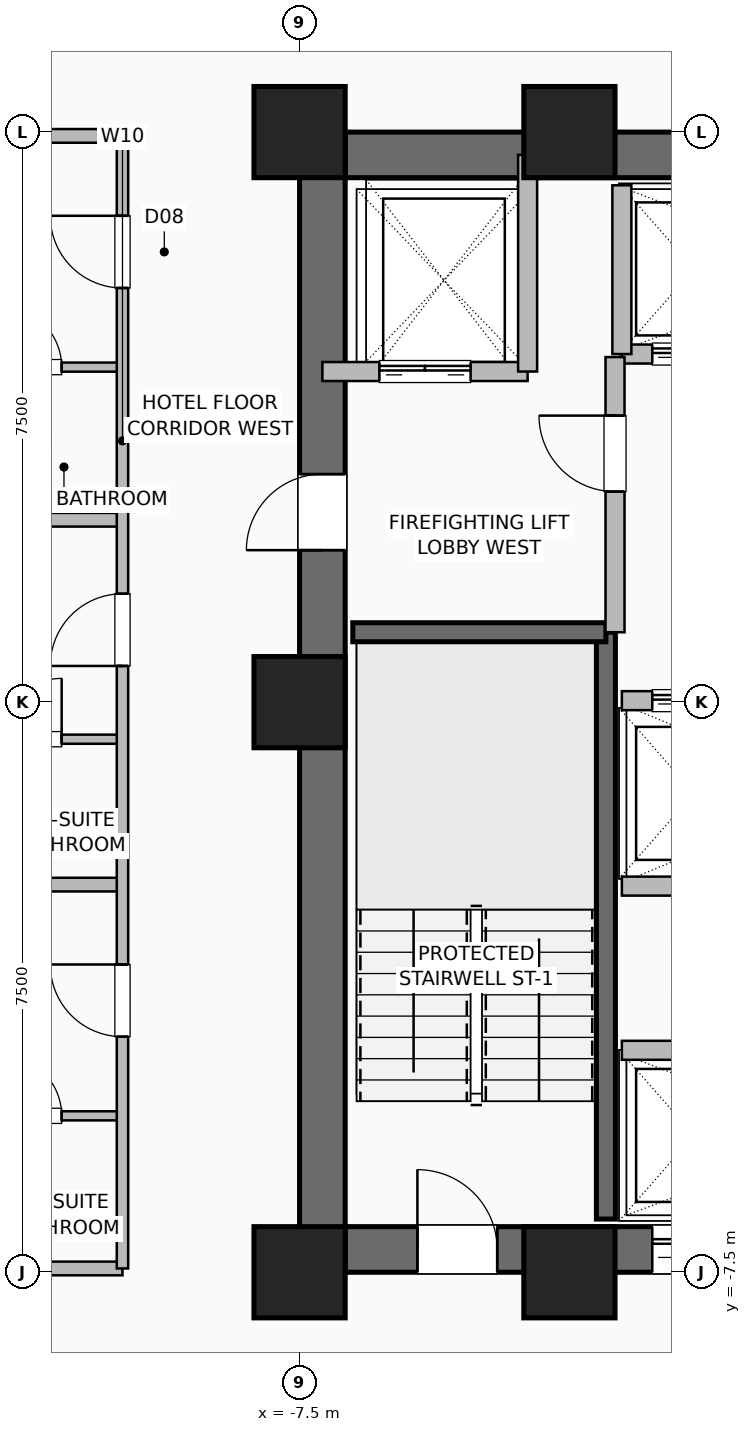
"""IFC4 building model, lengths in metres.
Left out: names, types, materials, properties, quantities, classifications, styles, units other than length and angle.
Written with IfcOpenShell. Run it as: python <this file> out.ifc"""

import sys

from ifc_helpers import new_model, si_unit, direction, frame, frame_2d, origin, origin_2d, place, context, subcontext, project, spatial, rectangle, hollow_rectangle, extrude, element, fill, save


model = new_model("IFC4")
c1 = context("Model", 3, precision=1e-05, world=origin(), true_north=direction((0.0, 1.0)))
c2 = subcontext(c1, "Body", "Model", "MODEL_VIEW")
j1 = project(units=[si_unit("LENGTHUNIT", "METRE"), si_unit("PLANEANGLEUNIT", "RADIAN")], contexts=[c1])
p1 = place(None, origin())
s1 = spatial("IfcSite", under=j1, at=p1, CompositionType="ELEMENT")
p2 = place(p1, origin())
s2 = spatial("IfcBuilding", under=s1, at=p2, CompositionType="ELEMENT")
p3 = place(p2, frame((0.0, 0.0, 34.0)))
s3 = spatial("IfcBuildingStorey", under=s2, at=p3, CompositionType="ELEMENT", Elevation=34.0)
for number, where, z_axis, x_axis in (
    (1, (-7.5, -7.5, 0.0), (0.0, 0.0, 1.0), (1.0, 0.0, 0.0)),
    (2, (-3.95, -7.5, 0.0), (0.0, 0.0, 1.0), (1.0, 0.0, 0.0)),
    (3, (-3.95, 7.5, 0.0), (0.0, 0.0, 1.0), (1.0, 0.0, 0.0)),
    (4, (-7.5, 7.5, 0.0), (0.0, 0.0, 1.0), (1.0, 0.0, 0.0)),
    (5, (-7.5, 0.0, 0.0), (0.0, 0.0, 1.0), (1.0, 0.0, 0.0)),
):
    element("IfcColumn", number, at=place(p3, frame(where, z_axis=z_axis, x_axis=x_axis)), inside=s3, PredefinedType="COLUMN", context=c2, shape_type="SweptSolid", body=[
        extrude(hollow_rectangle(XDim=1.2, YDim=1.2, WallThickness=0.055, at=origin_2d()), origin(), (0.0, 0.0, 1.0), 3.5),
    ])
p4 = place(p3, frame((-7.5, -7.2, 0.0), z_axis=(0.0, 0.0, 1.0), x_axis=(1.0, 0.0, 0.0)))
e6 = element("IfcWall", 6, at=p4, inside=s3, PredefinedType="SHEAR", context=c2, shape_type="SweptSolid", body=[
    extrude(rectangle(XDim=15.0, YDim=0.6, at=frame_2d((7.5, 0.0))), origin(), (0.0, 0.0, 1.0), 3.25),
])
p5 = place(p4, frame((1.55, 0.0, 0.0)))
e7 = element("IfcOpeningElement", 7, at=p5, cuts=e6, PredefinedType="OPENING", context=c2, shape_type="SweptSolid", body=[
    extrude(rectangle(XDim=1.05, YDim=2.08, at=frame_2d((0.525, 1.04))), frame((0.0, 0.31, 0.0), z_axis=(0.0, -1.0, 0.0), x_axis=(1.0, 0.0, 0.0)), (0.0, 0.0, 1.0), 0.62),
])
p6 = place(p4, frame((12.4, 0.0, 0.0)))
e8 = element("IfcOpeningElement", 8, at=p6, cuts=e6, PredefinedType="OPENING", context=c2, shape_type="SweptSolid", body=[
    extrude(rectangle(XDim=1.05, YDim=2.08, at=frame_2d((0.525, 1.04))), frame((0.0, 0.31, 0.0), z_axis=(0.0, -1.0, 0.0), x_axis=(1.0, 0.0, 0.0)), (0.0, 0.0, 1.0), 0.62),
])
p7 = place(p4, frame((4.64, 0.0, 0.0)))
e9 = element("IfcOpeningElement", 9, at=p7, cuts=e6, PredefinedType="OPENING", context=c2, shape_type="SweptSolid", body=[
    extrude(rectangle(XDim=1.1, YDim=2.2, at=frame_2d((0.55, 1.1))), frame((0.0, 0.31, 0.0), z_axis=(0.0, -1.0, 0.0), x_axis=(1.0, 0.0, 0.0)), (0.0, 0.0, 1.0), 0.62),
])
p8 = place(p4, frame((6.52, 0.0, 0.0)))
e10 = element("IfcOpeningElement", 10, at=p8, cuts=e6, PredefinedType="OPENING", context=c2, shape_type="SweptSolid", body=[
    extrude(rectangle(XDim=1.1, YDim=2.2, at=frame_2d((0.55, 1.1))), frame((0.0, 0.31, 0.0), z_axis=(0.0, -1.0, 0.0), x_axis=(1.0, 0.0, 0.0)), (0.0, 0.0, 1.0), 0.62),
])
p9 = place(p4, frame((8.4, 0.0, 0.0)))
e11 = element("IfcOpeningElement", 11, at=p9, cuts=e6, PredefinedType="OPENING", context=c2, shape_type="SweptSolid", body=[
    extrude(rectangle(XDim=1.1, YDim=2.2, at=frame_2d((0.55, 1.1))), frame((0.0, 0.31, 0.0), z_axis=(0.0, -1.0, 0.0), x_axis=(1.0, 0.0, 0.0)), (0.0, 0.0, 1.0), 0.62),
])
p10 = place(p3, frame((-7.5, 7.2, 0.0), z_axis=(0.0, 0.0, 1.0), x_axis=(1.0, 0.0, 0.0)))
e12 = element("IfcWall", 12, at=p10, inside=s3, PredefinedType="SHEAR", context=c2, shape_type="SweptSolid", body=[
    extrude(rectangle(XDim=15.0, YDim=0.6, at=frame_2d((7.5, 0.0))), origin(), (0.0, 0.0, 1.0), 3.25),
])
p11 = place(p3, frame((-7.2, -7.5, 0.0), z_axis=(0.0, 0.0, 1.0), x_axis=(0.0, 1.0, 0.0)))
e13 = element("IfcWall", 13, at=p11, inside=s3, PredefinedType="SHEAR", context=c2, shape_type="SweptSolid", body=[
    extrude(rectangle(XDim=15.0, YDim=0.6, at=frame_2d((7.5, 0.0))), origin(), (0.0, 0.0, 1.0), 3.25),
])
p12 = place(p11, frame((9.5, 0.0, 0.0)))
e14 = element("IfcOpeningElement", 14, at=p12, cuts=e13, PredefinedType="OPENING", context=c2, shape_type="SweptSolid", body=[
    extrude(rectangle(XDim=1.0, YDim=2.08, at=frame_2d((0.5, 1.04))), frame((0.0, 0.31, 0.0), z_axis=(0.0, -1.0, 0.0), x_axis=(1.0, 0.0, 0.0)), (0.0, 0.0, 1.0), 0.62),
])
p13 = place(p3, frame((-3.47, -6.8, 0.0), z_axis=(0.0, 0.0, 1.0), x_axis=(0.0, 1.0, 0.0)))
e15 = element("IfcWall", 15, at=p13, inside=s3, PredefinedType="SHEAR", context=c2, shape_type="SweptSolid", body=[
    extrude(rectangle(XDim=7.72, YDim=0.25, at=frame_2d((3.86, 0.0))), origin(), (0.0, 0.0, 1.0), 3.25),
])
p14 = place(p3, frame((-6.8, 0.92, 0.0), z_axis=(0.0, 0.0, 1.0), x_axis=(1.0, 0.0, 0.0)))
e16 = element("IfcWall", 16, at=p14, inside=s3, PredefinedType="SHEAR", context=c2, shape_type="SweptSolid", body=[
    extrude(rectangle(XDim=3.33, YDim=0.25, at=frame_2d((1.665, 0.0))), origin(), (0.0, 0.0, 1.0), 3.25),
])
p15 = place(p3, frame((-3.26, -4.58, 0.0), z_axis=(0.0, 0.0, 1.0), x_axis=(1.0, 0.0, 0.0)))
e17 = element("IfcWall", 17, at=p15, inside=s3, PredefinedType="SHEAR", context=c2, shape_type="SweptSolid", body=[
    extrude(rectangle(XDim=5.64, YDim=0.25, at=frame_2d((2.82, 0.0))), origin(), (0.0, 0.0, 1.0), 3.25),
])
p16 = place(p3, frame((-3.26, 0.02, 0.0), z_axis=(0.0, 0.0, 1.0), x_axis=(1.0, 0.0, 0.0)))
e18 = element("IfcWall", 18, at=p16, inside=s3, PredefinedType="SHEAR", context=c2, shape_type="SweptSolid", body=[
    extrude(rectangle(XDim=5.64, YDim=0.25, at=frame_2d((2.82, 0.0))), origin(), (0.0, 0.0, 1.0), 3.25),
])
p17 = place(p16, frame((0.4, 0.0, 0.0)))
e19 = element("IfcOpeningElement", 19, at=p17, cuts=e18, PredefinedType="OPENING", context=c2, shape_type="SweptSolid", body=[
    extrude(rectangle(XDim=1.1, YDim=2.2, at=frame_2d((0.55, 1.1))), frame((0.0, 0.135, 0.0), z_axis=(0.0, -1.0, 0.0), x_axis=(1.0, 0.0, 0.0)), (0.0, 0.0, 1.0), 0.27),
])
p18 = place(p16, frame((2.28, 0.0, 0.0)))
e20 = element("IfcOpeningElement", 20, at=p18, cuts=e18, PredefinedType="OPENING", context=c2, shape_type="SweptSolid", body=[
    extrude(rectangle(XDim=1.1, YDim=2.2, at=frame_2d((0.55, 1.1))), frame((0.0, 0.135, 0.0), z_axis=(0.0, -1.0, 0.0), x_axis=(1.0, 0.0, 0.0)), (0.0, 0.0, 1.0), 0.27),
])
p19 = place(p16, frame((4.16, 0.0, 0.0)))
e21 = element("IfcOpeningElement", 21, at=p19, cuts=e18, PredefinedType="OPENING", context=c2, shape_type="SweptSolid", body=[
    extrude(rectangle(XDim=1.1, YDim=2.2, at=frame_2d((0.55, 1.1))), frame((0.0, 0.135, 0.0), z_axis=(0.0, -1.0, 0.0), x_axis=(1.0, 0.0, 0.0)), (0.0, 0.0, 1.0), 0.27),
])
p20 = place(p3, frame((-3.26, -2.42, 0.0), z_axis=(0.0, 0.0, 1.0), x_axis=(1.0, 0.0, 0.0)))
e22 = element("IfcWall", 22, at=p20, inside=s3, PredefinedType="SHEAR", context=c2, shape_type="SweptSolid", body=[
    extrude(rectangle(XDim=5.64, YDim=0.25, at=frame_2d((2.82, 0.0))), origin(), (0.0, 0.0, 1.0), 3.25),
])
p21 = place(p3, frame((-3.26, 4.58, 0.0), z_axis=(0.0, 0.0, 1.0), x_axis=(1.0, 0.0, 0.0)))
e23 = element("IfcWall", 23, at=p21, inside=s3, PredefinedType="SHEAR", context=c2, shape_type="SweptSolid", body=[
    extrude(rectangle(XDim=5.64, YDim=0.25, at=frame_2d((2.82, 0.0))), origin(), (0.0, 0.0, 1.0), 3.25),
])
p22 = place(p21, frame((0.4, 0.0, 0.0)))
e24 = element("IfcOpeningElement", 24, at=p22, cuts=e23, PredefinedType="OPENING", context=c2, shape_type="SweptSolid", body=[
    extrude(rectangle(XDim=1.1, YDim=2.2, at=frame_2d((0.55, 1.1))), frame((0.0, 0.135, 0.0), z_axis=(0.0, -1.0, 0.0), x_axis=(1.0, 0.0, 0.0)), (0.0, 0.0, 1.0), 0.27),
])
p23 = place(p21, frame((2.28, 0.0, 0.0)))
e25 = element("IfcOpeningElement", 25, at=p23, cuts=e23, PredefinedType="OPENING", context=c2, shape_type="SweptSolid", body=[
    extrude(rectangle(XDim=1.1, YDim=2.2, at=frame_2d((0.55, 1.1))), frame((0.0, 0.135, 0.0), z_axis=(0.0, -1.0, 0.0), x_axis=(1.0, 0.0, 0.0)), (0.0, 0.0, 1.0), 0.27),
])
p24 = place(p21, frame((4.16, 0.0, 0.0)))
e26 = element("IfcOpeningElement", 26, at=p24, cuts=e23, PredefinedType="OPENING", context=c2, shape_type="SweptSolid", body=[
    extrude(rectangle(XDim=1.1, YDim=2.2, at=frame_2d((0.55, 1.1))), frame((0.0, 0.135, 0.0), z_axis=(0.0, -1.0, 0.0), x_axis=(1.0, 0.0, 0.0)), (0.0, 0.0, 1.0), 0.27),
])
p25 = place(p3, frame((-3.26, 4.58, 0.0), z_axis=(0.0, 0.0, 1.0), x_axis=(0.0, 1.0, 0.0)))
e27 = element("IfcWall", 27, at=p25, inside=s3, PredefinedType="SHEAR", context=c2, shape_type="SweptSolid", body=[
    extrude(rectangle(XDim=2.22, YDim=0.25, at=frame_2d((1.11, 0.0))), origin(), (0.0, 0.0, 1.0), 3.25),
])
p26 = place(p3, frame((-7.2, 4.35, 0.0), z_axis=(0.0, 0.0, 1.0), x_axis=(1.0, 0.0, 0.0)))
e28 = element("IfcWall", 28, at=p26, inside=s3, PredefinedType="SHEAR", context=c2, shape_type="SweptSolid", body=[
    extrude(rectangle(XDim=2.7, YDim=0.25, at=frame_2d((1.35, 0.0))), origin(), (0.0, 0.0, 1.0), 3.25),
])
p27 = place(p26, frame((0.75, 0.0, 0.0)))
e29 = element("IfcOpeningElement", 29, at=p27, cuts=e28, PredefinedType="OPENING", context=c2, shape_type="SweptSolid", body=[
    extrude(rectangle(XDim=1.2, YDim=2.2, at=frame_2d((0.6, 1.1))), frame((0.0, 0.135, 0.0), z_axis=(0.0, -1.0, 0.0), x_axis=(1.0, 0.0, 0.0)), (0.0, 0.0, 1.0), 0.27),
])
p28 = place(p3, frame((-4.5, 4.35, 0.0), z_axis=(0.0, 0.0, 1.0), x_axis=(0.0, 1.0, 0.0)))
e30 = element("IfcWall", 30, at=p28, inside=s3, PredefinedType="SHEAR", context=c2, shape_type="SweptSolid", body=[
    extrude(rectangle(XDim=2.85, YDim=0.25, at=frame_2d((1.425, 0.0))), origin(), (0.0, 0.0, 1.0), 3.25),
])
p29 = place(p3, frame((-3.35, 0.92, 0.0), z_axis=(0.0, 0.0, 1.0), x_axis=(0.0, 1.0, 0.0)))
e31 = element("IfcWall", 31, at=p29, inside=s3, PredefinedType="SHEAR", context=c2, shape_type="SweptSolid", body=[
    extrude(rectangle(XDim=3.62, YDim=0.25, at=frame_2d((1.81, 0.0))), origin(), (0.0, 0.0, 1.0), 3.25),
])
p30 = place(p29, frame((1.85, 0.0, 0.0)))
e32 = element("IfcOpeningElement", 32, at=p30, cuts=e31, PredefinedType="OPENING", context=c2, shape_type="SweptSolid", body=[
    extrude(rectangle(XDim=1.0, YDim=2.08, at=frame_2d((0.5, 1.04))), frame((0.0, 0.135, 0.0), z_axis=(0.0, -1.0, 0.0), x_axis=(1.0, 0.0, 0.0)), (0.0, 0.0, 1.0), 0.27),
])
p31 = place(p3, frame((-12.08, -5.442, 0.0), z_axis=(0.0, 0.0, 1.0), x_axis=(1.0, 0.0, 0.0)))
e33 = element("IfcWall", 33, at=p31, inside=s3, PredefinedType="PLUMBINGWALL", context=c2, shape_type="SweptSolid", body=[
    extrude(rectangle(XDim=2.25, YDim=0.12, at=frame_2d((1.125, 0.0))), origin(), (0.0, 0.0, 1.0), 3.25),
])
p32 = place(p31, frame((0.65, 0.0, 0.0)))
e34 = element("IfcOpeningElement", 34, at=p32, cuts=e33, PredefinedType="OPENING", context=c2, shape_type="SweptSolid", body=[
    extrude(rectangle(XDim=0.8, YDim=2.05, at=frame_2d((0.4, 1.025))), frame((0.0, 0.07, 0.0), z_axis=(0.0, -1.0, 0.0), x_axis=(1.0, 0.0, 0.0)), (0.0, 0.0, 1.0), 0.14),
])
p33 = place(p3, frame((-12.08, -0.487, 0.0), z_axis=(0.0, 0.0, 1.0), x_axis=(1.0, 0.0, 0.0)))
e35 = element("IfcWall", 35, at=p33, inside=s3, PredefinedType="PLUMBINGWALL", context=c2, shape_type="SweptSolid", body=[
    extrude(rectangle(XDim=2.25, YDim=0.12, at=frame_2d((1.125, 0.0))), origin(), (0.0, 0.0, 1.0), 3.25),
])
p34 = place(p33, frame((0.65, 0.0, 0.0)))
e36 = element("IfcOpeningElement", 36, at=p34, cuts=e35, PredefinedType="OPENING", context=c2, shape_type="SweptSolid", body=[
    extrude(rectangle(XDim=0.8, YDim=2.05, at=frame_2d((0.4, 1.025))), frame((0.0, 0.07, 0.0), z_axis=(0.0, -1.0, 0.0), x_axis=(1.0, 0.0, 0.0)), (0.0, 0.0, 1.0), 0.14),
])
p35 = place(p3, frame((-12.08, 4.408, 0.0), z_axis=(0.0, 0.0, 1.0), x_axis=(1.0, 0.0, 0.0)))
e37 = element("IfcWall", 37, at=p35, inside=s3, PredefinedType="PLUMBINGWALL", context=c2, shape_type="SweptSolid", body=[
    extrude(rectangle(XDim=2.25, YDim=0.12, at=frame_2d((1.125, 0.0))), origin(), (0.0, 0.0, 1.0), 3.25),
])
p36 = place(p35, frame((0.65, 0.0, 0.0)))
e38 = element("IfcOpeningElement", 38, at=p36, cuts=e37, PredefinedType="OPENING", context=c2, shape_type="SweptSolid", body=[
    extrude(rectangle(XDim=0.8, YDim=2.05, at=frame_2d((0.4, 1.025))), frame((0.0, 0.07, 0.0), z_axis=(0.0, -1.0, 0.0), x_axis=(1.0, 0.0, 0.0)), (0.0, 0.0, 1.0), 0.14),
])
for number, where, z_axis, x_axis in (
    (39, (-23.82, -7.45, 0.0), (0.0, 0.0, 1.0), (1.0, 0.0, 0.0)),
    (40, (-23.82, -2.4, 0.0), (0.0, 0.0, 1.0), (1.0, 0.0, 0.0)),
    (41, (-23.82, 2.4, 0.0), (0.0, 0.0, 1.0), (1.0, 0.0, 0.0)),
    (42, (-23.82, 7.45, 0.0), (0.0, 0.0, 1.0), (1.0, 0.0, 0.0)),
):
    element("IfcWall", number, at=place(p3, frame(where, z_axis=z_axis, x_axis=x_axis)), inside=s3, PredefinedType="PARTITIONING", context=c2, shape_type="SweptSolid", body=[
        extrude(rectangle(XDim=13.99, YDim=0.18, at=frame_2d((6.995, 0.0))), origin(), (0.0, 0.0, 1.0), 3.25),
    ])
p37 = place(p3, frame((-9.83, -7.45, 0.0), z_axis=(0.0, 0.0, 1.0), x_axis=(0.0, 1.0, 0.0)))
e43 = element("IfcWall", 43, at=p37, inside=s3, PredefinedType="PARTITIONING", context=c2, shape_type="SweptSolid", body=[
    extrude(rectangle(XDim=14.9, YDim=0.15, at=frame_2d((7.45, 0.0))), origin(), (0.0, 0.0, 1.0), 3.25),
])
p38 = place(p37, frame((3.049, 0.0, 0.0)))
e44 = element("IfcOpeningElement", 44, at=p38, cuts=e43, PredefinedType="OPENING", context=c2, shape_type="SweptSolid", body=[
    extrude(rectangle(XDim=0.95, YDim=2.08, at=frame_2d((0.475, 1.04))), frame((0.0, 0.085, 0.0), z_axis=(0.0, -1.0, 0.0), x_axis=(1.0, 0.0, 0.0)), (0.0, 0.0, 1.0), 0.17),
])
p39 = place(p37, frame((7.927, 0.0, 0.0)))
e45 = element("IfcOpeningElement", 45, at=p39, cuts=e43, PredefinedType="OPENING", context=c2, shape_type="SweptSolid", body=[
    extrude(rectangle(XDim=0.95, YDim=2.08, at=frame_2d((0.475, 1.04))), frame((0.0, 0.085, 0.0), z_axis=(0.0, -1.0, 0.0), x_axis=(1.0, 0.0, 0.0)), (0.0, 0.0, 1.0), 0.17),
])
p40 = place(p37, frame((12.899, 0.0, 0.0)))
e46 = element("IfcOpeningElement", 46, at=p40, cuts=e43, PredefinedType="OPENING", context=c2, shape_type="SweptSolid", body=[
    extrude(rectangle(XDim=0.95, YDim=2.08, at=frame_2d((0.475, 1.04))), frame((0.0, 0.085, 0.0), z_axis=(0.0, -1.0, 0.0), x_axis=(1.0, 0.0, 0.0)), (0.0, 0.0, 1.0), 0.17),
])
p41 = place(p5, origin())
e47 = element("IfcDoor", 47, at=p41, inside=s3, OperationType="SINGLE_SWING_LEFT", PredefinedType="DOOR", context=c2, shape_type="SweptSolid", body=[
    extrude(rectangle(XDim=1.05, YDim=2.08, at=frame_2d((0.525, 1.04))), frame((0.0, 0.025, 0.0), z_axis=(0.0, -1.0, 0.0), x_axis=(1.0, 0.0, 0.0)), (0.0, 0.0, 1.0), 0.05),
])
fill(e7, e47)
p42 = place(p12, origin())
e48 = element("IfcDoor", 48, at=p42, inside=s3, OperationType="SINGLE_SWING_LEFT", PredefinedType="DOOR", context=c2, shape_type="SweptSolid", body=[
    extrude(rectangle(XDim=1.0, YDim=2.08, at=frame_2d((0.5, 1.04))), frame((0.0, 0.025, 0.0), z_axis=(0.0, -1.0, 0.0), x_axis=(1.0, 0.0, 0.0)), (0.0, 0.0, 1.0), 0.05),
])
fill(e14, e48)
p43 = place(p7, origin())
e49 = element("IfcDoor", 49, at=p43, inside=s3, OperationType="DOUBLE_DOOR_SLIDING", PredefinedType="DOOR", context=c2, shape_type="SweptSolid", body=[
    extrude(rectangle(XDim=1.1, YDim=2.2, at=frame_2d((0.55, 1.1))), frame((0.0, 0.025, 0.0), z_axis=(0.0, -1.0, 0.0), x_axis=(1.0, 0.0, 0.0)), (0.0, 0.0, 1.0), 0.05),
])
fill(e9, e49)
p44 = place(p17, origin())
e50 = element("IfcDoor", 50, at=p44, inside=s3, OperationType="DOUBLE_DOOR_SLIDING", PredefinedType="DOOR", context=c2, shape_type="SweptSolid", body=[
    extrude(rectangle(XDim=1.1, YDim=2.2, at=frame_2d((0.55, 1.1))), frame((0.0, 0.025, 0.0), z_axis=(0.0, -1.0, 0.0), x_axis=(1.0, 0.0, 0.0)), (0.0, 0.0, 1.0), 0.05),
])
fill(e19, e50)
p45 = place(p22, origin())
e51 = element("IfcDoor", 51, at=p45, inside=s3, OperationType="DOUBLE_DOOR_SLIDING", PredefinedType="DOOR", context=c2, shape_type="SweptSolid", body=[
    extrude(rectangle(XDim=1.1, YDim=2.2, at=frame_2d((0.55, 1.1))), frame((0.0, 0.025, 0.0), z_axis=(0.0, -1.0, 0.0), x_axis=(1.0, 0.0, 0.0)), (0.0, 0.0, 1.0), 0.05),
])
fill(e24, e51)
p46 = place(p27, origin())
e52 = element("IfcDoor", 52, at=p46, inside=s3, OperationType="DOUBLE_DOOR_SLIDING", PredefinedType="DOOR", context=c2, shape_type="SweptSolid", body=[
    extrude(rectangle(XDim=1.2, YDim=2.2, at=frame_2d((0.6, 1.1))), frame((0.0, 0.025, 0.0), z_axis=(0.0, -1.0, 0.0), x_axis=(1.0, 0.0, 0.0)), (0.0, 0.0, 1.0), 0.05),
])
fill(e29, e52)
p47 = place(p30, origin())
e53 = element("IfcDoor", 53, at=p47, inside=s3, OperationType="SINGLE_SWING_RIGHT", PredefinedType="DOOR", context=c2, shape_type="SweptSolid", body=[
    extrude(rectangle(XDim=1.0, YDim=2.08, at=frame_2d((0.5, 1.04))), frame((0.0, 0.025, 0.0), z_axis=(0.0, -1.0, 0.0), x_axis=(1.0, 0.0, 0.0)), (0.0, 0.0, 1.0), 0.05),
])
fill(e32, e53)
p48 = place(p32, origin())
e54 = element("IfcDoor", 54, at=p48, inside=s3, OperationType="SINGLE_SWING_LEFT", PredefinedType="DOOR", context=c2, shape_type="SweptSolid", body=[
    extrude(rectangle(XDim=0.8, YDim=2.05, at=frame_2d((0.4, 1.025))), frame((0.0, 0.025, 0.0), z_axis=(0.0, -1.0, 0.0), x_axis=(1.0, 0.0, 0.0)), (0.0, 0.0, 1.0), 0.05),
])
fill(e34, e54)
p49 = place(p34, origin())
e55 = element("IfcDoor", 55, at=p49, inside=s3, OperationType="SINGLE_SWING_RIGHT", PredefinedType="DOOR", context=c2, shape_type="SweptSolid", body=[
    extrude(rectangle(XDim=0.8, YDim=2.05, at=frame_2d((0.4, 1.025))), frame((0.0, 0.025, 0.0), z_axis=(0.0, -1.0, 0.0), x_axis=(1.0, 0.0, 0.0)), (0.0, 0.0, 1.0), 0.05),
])
fill(e36, e55)
p50 = place(p36, origin())
e56 = element("IfcDoor", 56, at=p50, inside=s3, OperationType="SINGLE_SWING_LEFT", PredefinedType="DOOR", context=c2, shape_type="SweptSolid", body=[
    extrude(rectangle(XDim=0.8, YDim=2.05, at=frame_2d((0.4, 1.025))), frame((0.0, 0.025, 0.0), z_axis=(0.0, -1.0, 0.0), x_axis=(1.0, 0.0, 0.0)), (0.0, 0.0, 1.0), 0.05),
])
fill(e38, e56)
p51 = place(p38, origin())
e57 = element("IfcDoor", 57, at=p51, inside=s3, OperationType="SINGLE_SWING_RIGHT", PredefinedType="DOOR", context=c2, shape_type="SweptSolid", body=[
    extrude(rectangle(XDim=0.95, YDim=2.08, at=frame_2d((0.475, 1.04))), frame((0.0, 0.025, 0.0), z_axis=(0.0, -1.0, 0.0), x_axis=(1.0, 0.0, 0.0)), (0.0, 0.0, 1.0), 0.05),
])
fill(e44, e57)
p52 = place(p39, origin())
e58 = element("IfcDoor", 58, at=p52, inside=s3, OperationType="SINGLE_SWING_LEFT", PredefinedType="DOOR", context=c2, shape_type="SweptSolid", body=[
    extrude(rectangle(XDim=0.95, YDim=2.08, at=frame_2d((0.475, 1.04))), frame((0.0, 0.025, 0.0), z_axis=(0.0, -1.0, 0.0), x_axis=(1.0, 0.0, 0.0)), (0.0, 0.0, 1.0), 0.05),
])
fill(e45, e58)
p53 = place(p40, origin())
e59 = element("IfcDoor", 59, at=p53, inside=s3, OperationType="SINGLE_SWING_RIGHT", PredefinedType="DOOR", context=c2, shape_type="SweptSolid", body=[
    extrude(rectangle(XDim=0.95, YDim=2.08, at=frame_2d((0.475, 1.04))), frame((0.0, 0.025, 0.0), z_axis=(0.0, -1.0, 0.0), x_axis=(1.0, 0.0, 0.0)), (0.0, 0.0, 1.0), 0.05),
])
fill(e46, e59)
save(model, sys.argv[1])
